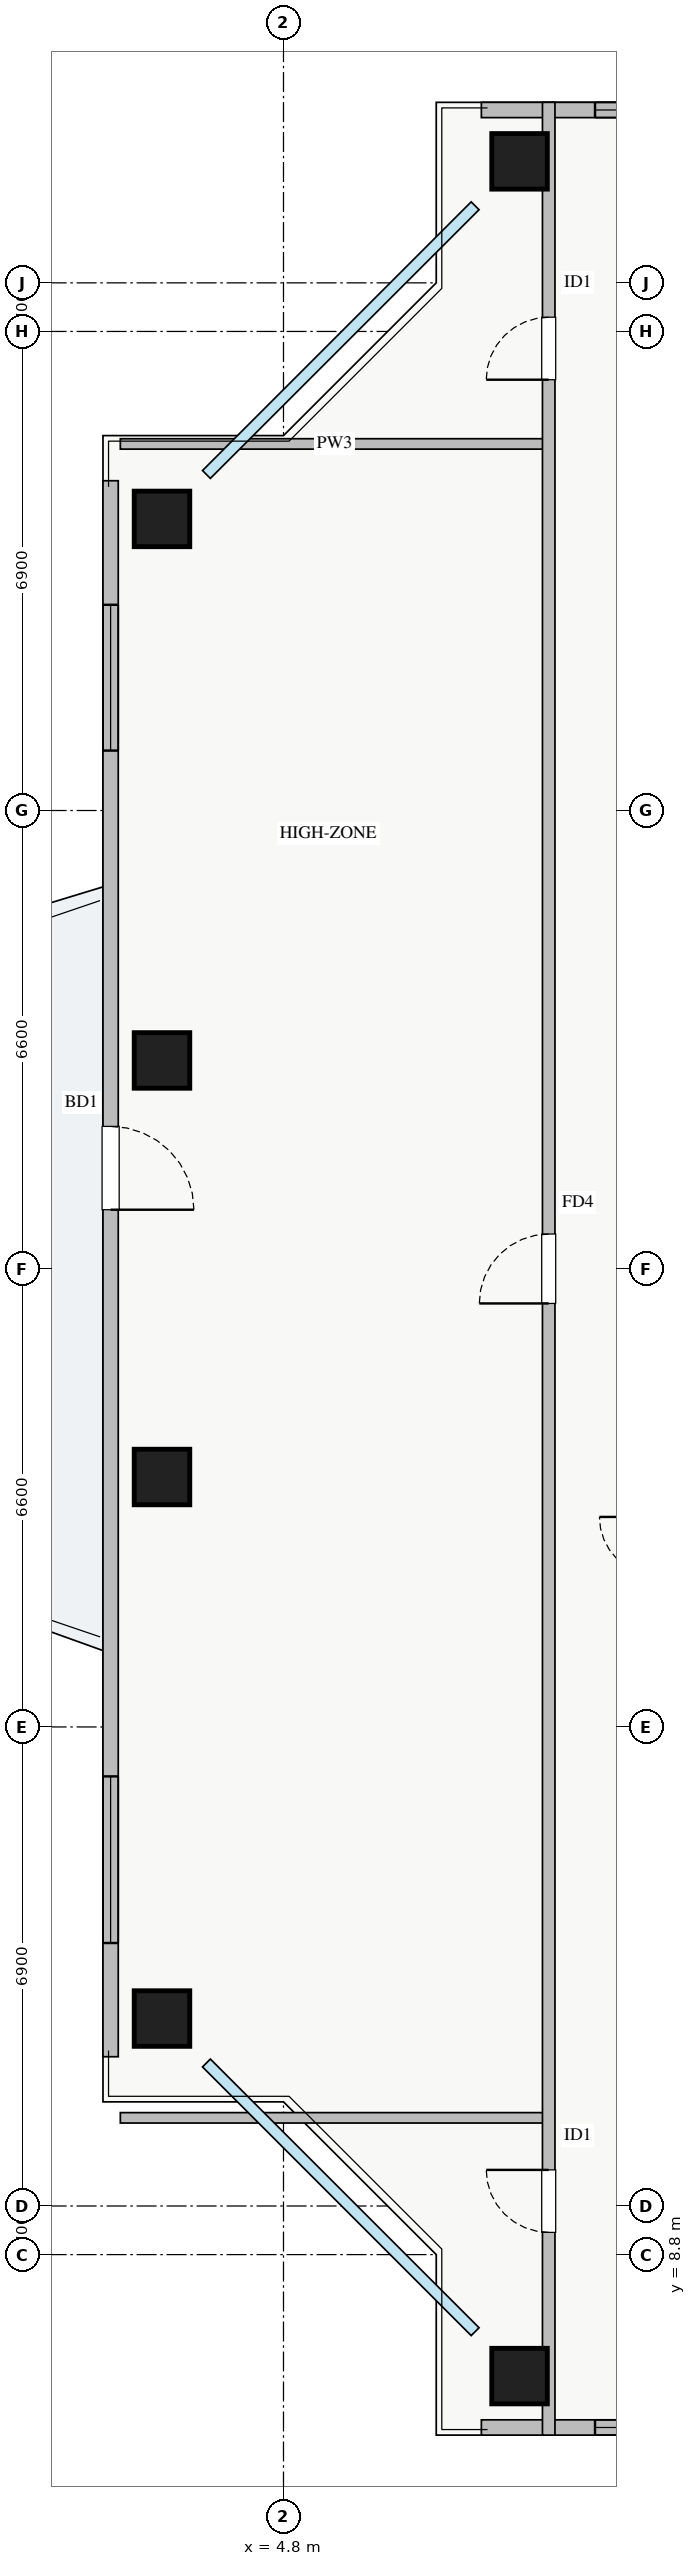
"""IFC4 building model, lengths in metres.
Left out: names, types, materials, properties, quantities, classifications, styles, units other than length and angle.
Written with IfcOpenShell. Run it as: python <this file> out.ifc"""

import sys

from ifc_helpers import new_model, si_unit, direction, frame, frame_2d, origin, origin_2d, place, context, subcontext, project, spatial, rectangle, extrude, source, transform, mapped, element, fill, save


model = new_model("IFC4")
c1 = context("Model", 3, precision=1e-05, world=origin(), true_north=direction((0.0, 1.0)))
c2 = subcontext(c1, "Body", "Model", "MODEL_VIEW")
j1 = project(units=[si_unit("LENGTHUNIT", "METRE"), si_unit("PLANEANGLEUNIT", "RADIAN")], contexts=[c1])
p1 = place(None, origin())
s1 = spatial("IfcSite", under=j1, at=p1, CompositionType="ELEMENT")
p2 = place(p1, origin())
s2 = spatial("IfcBuilding", under=s1, at=p2, CompositionType="ELEMENT")
p3 = place(p2, frame((0.0, 0.0, 226.25)))
s3 = spatial("IfcBuildingStorey", under=s2, at=p3, CompositionType="ELEMENT", Elevation=226.25)
m1 = source(origin(), c2, "Body", "SweptSolid", [
    extrude(rectangle(XDim=0.8, YDim=0.8, at=origin_2d()), origin(), (0.0, 0.0, 1.0), 3.25),
])
for number, where, z_axis, x_axis in (
    (1, (8.2, 7.05, 0.0), (0.0, 0.0, 1.0), (1.0, 0.0, 0.0)),
    (2, (8.2, 38.95, 0.0), (0.0, 0.0, 1.0), (1.0, 0.0, 0.0)),
    (3, (3.05, 33.8, 0.0), (0.0, 0.0, 1.0), (1.0, 0.0, 0.0)),
    (4, (3.05, 26.0, 0.0), (0.0, 0.0, 1.0), (1.0, 0.0, 0.0)),
    (5, (3.05, 20.0, 0.0), (0.0, 0.0, 1.0), (1.0, 0.0, 0.0)),
    (6, (3.05, 12.2, 0.0), (0.0, 0.0, 1.0), (1.0, 0.0, 0.0)),
):
    element("IfcColumn", number, at=place(p3, frame(where, z_axis=z_axis, x_axis=x_axis)), inside=s3, PredefinedType="COLUMN", context=c2, shape_type="MappedRepresentation", body=[
        mapped(m1, transform((0.0, 0.0, 0.0), x_axis=(1.0, 0.0, 0.0), y_axis=(0.0, 1.0, 0.0), z_axis=(0.0, 0.0, 1.0), scale=1.0)),
    ])
p4 = place(p3, frame((7.65, 6.31, 0.0), z_axis=(0.0, 0.0, 1.0), x_axis=(1.0, 0.0, 0.0)))
e7 = element("IfcWall", 7, at=p4, inside=s3, PredefinedType="STANDARD", context=c2, shape_type="SweptSolid", body=[
    extrude(rectangle(XDim=22.7, YDim=0.22, at=frame_2d((11.35, 0.0))), origin(), (0.0, 0.0, 1.0), 2.61),
])
p5 = place(p4, frame((12.2, 0.0, 0.0)))
e8 = element("IfcOpeningElement", 8, at=p5, cuts=e7, PredefinedType="OPENING", context=c2, shape_type="SweptSolid", body=[
    extrude(rectangle(XDim=1.2, YDim=2.1, at=frame_2d((0.6, 1.05))), frame((0.0, 0.12, 0.0), z_axis=(0.0, -1.0, 0.0), x_axis=(1.0, 0.0, 0.0)), (0.0, 0.0, 1.0), 0.24),
])
p6 = place(p4, frame((1.637, 0.0, 0.9)))
e9 = element("IfcOpeningElement", 9, at=p6, cuts=e7, PredefinedType="OPENING", context=c2, shape_type="SweptSolid", body=[
    extrude(rectangle(XDim=2.4, YDim=1.48, at=frame_2d((1.2, 0.74))), frame((0.0, 0.12, 0.0), z_axis=(0.0, -1.0, 0.0), x_axis=(1.0, 0.0, 0.0)), (0.0, 0.0, 1.0), 0.24),
])
p7 = place(p4, frame((7.612, 0.0, 0.9)))
e10 = element("IfcOpeningElement", 10, at=p7, cuts=e7, PredefinedType="OPENING", context=c2, shape_type="SweptSolid", body=[
    extrude(rectangle(XDim=1.8, YDim=1.45, at=frame_2d((0.9, 0.725))), frame((0.0, 0.12, 0.0), z_axis=(0.0, -1.0, 0.0), x_axis=(1.0, 0.0, 0.0)), (0.0, 0.0, 1.0), 0.24),
])
p8 = place(p4, frame((19.988, 0.0, 0.9)))
e11 = element("IfcOpeningElement", 11, at=p8, cuts=e7, PredefinedType="OPENING", context=c2, shape_type="SweptSolid", body=[
    extrude(rectangle(XDim=2.1, YDim=1.5, at=frame_2d((1.05, 0.75))), frame((0.0, 0.12, 0.0), z_axis=(0.0, -1.0, 0.0), x_axis=(1.0, 0.0, 0.0)), (0.0, 0.0, 1.0), 0.24),
])
p9 = place(p4, frame((16.27, 0.0, 0.9)))
e12 = element("IfcOpeningElement", 12, at=p9, cuts=e7, PredefinedType="OPENING", context=c2, shape_type="SweptSolid", body=[
    extrude(rectangle(XDim=2.4, YDim=1.5, at=frame_2d((1.2, 0.75))), frame((0.0, 0.12, 0.0), z_axis=(0.0, -1.0, 0.0), x_axis=(1.0, 0.0, 0.0)), (0.0, 0.0, 1.0), 0.24),
])
p10 = place(p3, frame((7.65, 39.69, 0.0), z_axis=(0.0, 0.0, 1.0), x_axis=(1.0, 0.0, 0.0)))
e13 = element("IfcWall", 13, at=p10, inside=s3, PredefinedType="STANDARD", context=c2, shape_type="SweptSolid", body=[
    extrude(rectangle(XDim=22.7, YDim=0.22, at=frame_2d((11.35, 0.0))), origin(), (0.0, 0.0, 1.0), 2.61),
])
p11 = place(p10, frame((12.2, 0.0, 0.0)))
e14 = element("IfcOpeningElement", 14, at=p11, cuts=e13, PredefinedType="OPENING", context=c2, shape_type="SweptSolid", body=[
    extrude(rectangle(XDim=1.2, YDim=2.1, at=frame_2d((0.6, 1.05))), frame((0.0, 0.12, 0.0), z_axis=(0.0, -1.0, 0.0), x_axis=(1.0, 0.0, 0.0)), (0.0, 0.0, 1.0), 0.24),
])
p12 = place(p10, frame((1.637, 0.0, 0.9)))
e15 = element("IfcOpeningElement", 15, at=p12, cuts=e13, PredefinedType="OPENING", context=c2, shape_type="SweptSolid", body=[
    extrude(rectangle(XDim=2.4, YDim=1.48, at=frame_2d((1.2, 0.74))), frame((0.0, 0.12, 0.0), z_axis=(0.0, -1.0, 0.0), x_axis=(1.0, 0.0, 0.0)), (0.0, 0.0, 1.0), 0.24),
])
p13 = place(p10, frame((7.612, 0.0, 0.9)))
e16 = element("IfcOpeningElement", 16, at=p13, cuts=e13, PredefinedType="OPENING", context=c2, shape_type="SweptSolid", body=[
    extrude(rectangle(XDim=1.8, YDim=1.45, at=frame_2d((0.9, 0.725))), frame((0.0, 0.12, 0.0), z_axis=(0.0, -1.0, 0.0), x_axis=(1.0, 0.0, 0.0)), (0.0, 0.0, 1.0), 0.24),
])
p14 = place(p10, frame((18.812, 0.0, 0.9)))
e17 = element("IfcOpeningElement", 17, at=p14, cuts=e13, PredefinedType="OPENING", context=c2, shape_type="SweptSolid", body=[
    extrude(rectangle(XDim=2.1, YDim=1.48, at=frame_2d((1.05, 0.74))), frame((0.0, 0.12, 0.0), z_axis=(0.0, -1.0, 0.0), x_axis=(1.0, 0.0, 0.0)), (0.0, 0.0, 1.0), 0.24),
])
p15 = place(p3, frame((2.31, 11.65, 0.0), z_axis=(0.0, 0.0, 1.0), x_axis=(0.0, 1.0, 0.0)))
e18 = element("IfcWall", 18, at=p15, inside=s3, PredefinedType="STANDARD", context=c2, shape_type="SweptSolid", body=[
    extrude(rectangle(XDim=22.7, YDim=0.22, at=frame_2d((11.35, 0.0))), origin(), (0.0, 0.0, 1.0), 2.61),
])
p16 = place(p15, frame((12.2, 0.0, 0.0)))
e19 = element("IfcOpeningElement", 19, at=p16, cuts=e18, PredefinedType="OPENING", context=c2, shape_type="SweptSolid", body=[
    extrude(rectangle(XDim=1.2, YDim=2.1, at=frame_2d((0.6, 1.05))), frame((0.0, 0.12, 0.0), z_axis=(0.0, -1.0, 0.0), x_axis=(1.0, 0.0, 0.0)), (0.0, 0.0, 1.0), 0.24),
])
p17 = place(p15, frame((1.638, 0.0, 0.9)))
e20 = element("IfcOpeningElement", 20, at=p17, cuts=e18, PredefinedType="OPENING", context=c2, shape_type="SweptSolid", body=[
    extrude(rectangle(XDim=2.4, YDim=1.48, at=frame_2d((1.2, 0.74))), frame((0.0, 0.12, 0.0), z_axis=(0.0, -1.0, 0.0), x_axis=(1.0, 0.0, 0.0)), (0.0, 0.0, 1.0), 0.24),
])
p18 = place(p15, frame((18.813, 0.0, 0.9)))
e21 = element("IfcOpeningElement", 21, at=p18, cuts=e18, PredefinedType="OPENING", context=c2, shape_type="SweptSolid", body=[
    extrude(rectangle(XDim=2.1, YDim=1.48, at=frame_2d((1.05, 0.74))), frame((0.0, 0.12, 0.0), z_axis=(0.0, -1.0, 0.0), x_axis=(1.0, 0.0, 0.0)), (0.0, 0.0, 1.0), 0.24),
])
for number, where, z_axis, x_axis in (
    (22, (2.45, 34.88, 0.0), (0.0, 0.0, 1.0), (1.0, 0.0, 0.0)),
    (23, (2.45, 10.77, 0.0), (0.0, 0.0, 1.0), (1.0, 0.0, 0.0)),
):
    element("IfcWall", number, at=place(p3, frame(where, z_axis=z_axis, x_axis=x_axis)), inside=s3, PredefinedType="PARTITIONING", context=c2, shape_type="SweptSolid", body=[
        extrude(rectangle(XDim=6.17, YDim=0.15, at=frame_2d((3.085, 0.0))), origin(), (0.0, 0.0, 1.0), 3.07),
    ])
p19 = place(p3, frame((8.62, 6.2, 0.0), z_axis=(0.0, 0.0, 1.0), x_axis=(0.0, 1.0, 0.0)))
e24 = element("IfcWall", 24, at=p19, inside=s3, PredefinedType="PARTITIONING", context=c2, shape_type="SweptSolid", body=[
    extrude(rectangle(XDim=33.6, YDim=0.18, at=frame_2d((16.8, 0.0))), origin(), (0.0, 0.0, 1.0), 3.07),
])
p20 = place(p19, frame((29.605, 0.0, 0.0)))
e25 = element("IfcOpeningElement", 25, at=p20, cuts=e24, PredefinedType="OPENING", context=c2, shape_type="SweptSolid", body=[
    extrude(rectangle(XDim=0.9, YDim=2.05, at=frame_2d((0.45, 1.025))), frame((0.0, 0.1, 0.0), z_axis=(0.0, -1.0, 0.0), x_axis=(1.0, 0.0, 0.0)), (0.0, 0.0, 1.0), 0.2),
])
p21 = place(p19, frame((2.92, 0.0, 0.0)))
e26 = element("IfcOpeningElement", 26, at=p21, cuts=e24, PredefinedType="OPENING", context=c2, shape_type="SweptSolid", body=[
    extrude(rectangle(XDim=0.9, YDim=2.05, at=frame_2d((0.45, 1.025))), frame((0.0, 0.1, 0.0), z_axis=(0.0, -1.0, 0.0), x_axis=(1.0, 0.0, 0.0)), (0.0, 0.0, 1.0), 0.2),
])
p22 = place(p19, frame((16.3, 0.0, 0.0)))
e27 = element("IfcOpeningElement", 27, at=p22, cuts=e24, PredefinedType="OPENING", context=c2, shape_type="SweptSolid", body=[
    extrude(rectangle(XDim=1.0, YDim=2.05, at=frame_2d((0.5, 1.025))), frame((0.0, 0.1, 0.0), z_axis=(0.0, -1.0, 0.0), x_axis=(1.0, 0.0, 0.0)), (0.0, 0.0, 1.0), 0.2),
])
m2 = source(origin(), c2, "Body", "SweptSolid", [
    extrude(rectangle(XDim=2.4, YDim=1.48, at=frame_2d((1.2, 0.74))), frame((0.0, 0.03, 0.0), z_axis=(0.0, -1.0, 0.0), x_axis=(1.0, 0.0, 0.0)), (0.0, 0.0, 1.0), 0.06),
])
p23 = place(p6, origin())
e28 = element("IfcWindow", 28, at=p23, inside=s3, PartitioningType="TRIPLE_PANEL_VERTICAL", PredefinedType="WINDOW", context=c2, shape_type="MappedRepresentation", body=[
    mapped(m2, transform((0.0, 0.0, 0.0), x_axis=(1.0, 0.0, 0.0), y_axis=(0.0, 1.0, 0.0), z_axis=(0.0, 0.0, 1.0), scale=1.0)),
])
fill(e9, e28)
p24 = place(p12, origin())
e29 = element("IfcWindow", 29, at=p24, inside=s3, PartitioningType="TRIPLE_PANEL_VERTICAL", PredefinedType="WINDOW", context=c2, shape_type="MappedRepresentation", body=[
    mapped(m2, transform((0.0, 0.0, 0.0), x_axis=(1.0, 0.0, 0.0), y_axis=(0.0, 1.0, 0.0), z_axis=(0.0, 0.0, 1.0), scale=1.0)),
])
fill(e15, e29)
m3 = source(origin(), c2, "Body", "SweptSolid", [
    extrude(rectangle(XDim=1.2, YDim=2.1, at=frame_2d((0.6, 1.05))), frame((0.0, 0.025, 0.0), z_axis=(0.0, -1.0, 0.0), x_axis=(1.0, 0.0, 0.0)), (0.0, 0.0, 1.0), 0.05),
])
p25 = place(p16, frame((1.2, 0.0, 0.0), z_axis=(0.0, 0.0, 1.0), x_axis=(-1.0, 0.0, 0.0)))
e30 = element("IfcDoor", 30, at=p25, inside=s3, OperationType="SINGLE_SWING_LEFT", PredefinedType="DOOR", context=c2, shape_type="MappedRepresentation", body=[
    mapped(m3, transform((0.0, 0.0, 0.0), x_axis=(1.0, 0.0, 0.0), y_axis=(0.0, 1.0, 0.0), z_axis=(0.0, 0.0, 1.0), scale=1.0)),
])
fill(e19, e30)
p26 = place(p17, origin())
e31 = element("IfcWindow", 31, at=p26, inside=s3, PartitioningType="TRIPLE_PANEL_VERTICAL", PredefinedType="WINDOW", context=c2, shape_type="MappedRepresentation", body=[
    mapped(m2, transform((0.0, 0.0, 0.0), x_axis=(1.0, 0.0, 0.0), y_axis=(0.0, 1.0, 0.0), z_axis=(0.0, 0.0, 1.0), scale=1.0)),
])
fill(e20, e31)
m4 = source(origin(), c2, "Body", "SweptSolid", [
    extrude(rectangle(XDim=2.1, YDim=1.48, at=frame_2d((1.05, 0.74))), frame((0.0, 0.03, 0.0), z_axis=(0.0, -1.0, 0.0), x_axis=(1.0, 0.0, 0.0)), (0.0, 0.0, 1.0), 0.06),
])
p27 = place(p18, origin())
e32 = element("IfcWindow", 32, at=p27, inside=s3, PartitioningType="TRIPLE_PANEL_VERTICAL", PredefinedType="WINDOW", context=c2, shape_type="MappedRepresentation", body=[
    mapped(m4, transform((0.0, 0.0, 0.0), x_axis=(1.0, 0.0, 0.0), y_axis=(0.0, 1.0, 0.0), z_axis=(0.0, 0.0, 1.0), scale=1.0)),
])
fill(e21, e32)
m5 = source(origin(), c2, "Body", "SweptSolid", [
    extrude(rectangle(XDim=0.9, YDim=2.05, at=frame_2d((0.45, 1.025))), frame((0.0, 0.025, 0.0), z_axis=(0.0, -1.0, 0.0), x_axis=(1.0, 0.0, 0.0)), (0.0, 0.0, 1.0), 0.05),
])
p28 = place(p20, origin())
e33 = element("IfcDoor", 33, at=p28, inside=s3, OperationType="SINGLE_SWING_LEFT", PredefinedType="DOOR", context=c2, shape_type="MappedRepresentation", body=[
    mapped(m5, transform((0.0, 0.0, 0.0), x_axis=(1.0, 0.0, 0.0), y_axis=(0.0, 1.0, 0.0), z_axis=(0.0, 0.0, 1.0), scale=1.0)),
])
fill(e25, e33)
p29 = place(p21, origin())
e34 = element("IfcDoor", 34, at=p29, inside=s3, OperationType="SINGLE_SWING_RIGHT", PredefinedType="DOOR", context=c2, shape_type="MappedRepresentation", body=[
    mapped(m5, transform((0.0, 0.0, 0.0), x_axis=(1.0, 0.0, 0.0), y_axis=(0.0, 1.0, 0.0), z_axis=(0.0, 0.0, 1.0), scale=1.0)),
])
fill(e26, e34)
m6 = source(origin(), c2, "Body", "SweptSolid", [
    extrude(rectangle(XDim=1.0, YDim=2.05, at=frame_2d((0.5, 1.025))), frame((0.0, 0.025, 0.0), z_axis=(0.0, -1.0, 0.0), x_axis=(1.0, 0.0, 0.0)), (0.0, 0.0, 1.0), 0.05),
])
p30 = place(p22, origin())
e35 = element("IfcDoor", 35, at=p30, inside=s3, OperationType="SINGLE_SWING_LEFT", PredefinedType="DOOR", context=c2, shape_type="MappedRepresentation", body=[
    mapped(m6, transform((0.0, 0.0, 0.0), x_axis=(1.0, 0.0, 0.0), y_axis=(0.0, 1.0, 0.0), z_axis=(0.0, 0.0, 1.0), scale=1.0)),
])
fill(e27, e35)
save(model, sys.argv[1])
